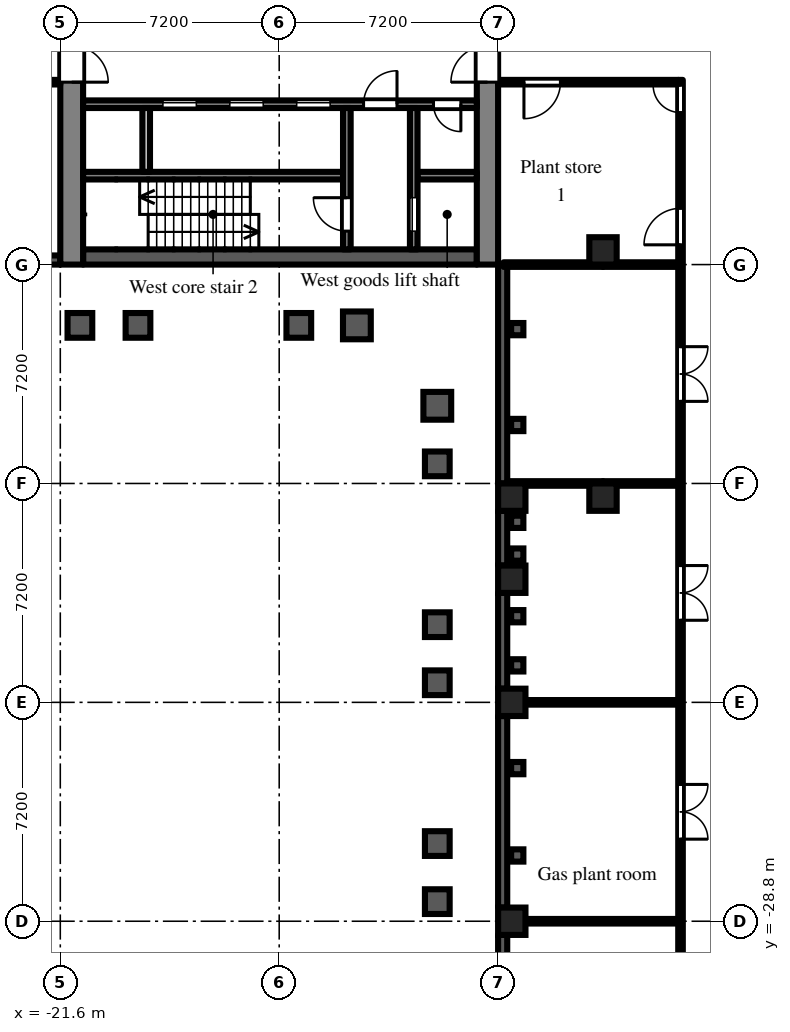
"""IFC4 building model, lengths in metres.
Left out: names, types, materials, properties, quantities, classifications, styles, units other than length and angle.
Written with IfcOpenShell. Run it as: python <this file> out.ifc"""

import sys

from ifc_helpers import new_model, si_unit, direction, frame, frame_2d, origin, origin_2d, place, context, subcontext, project, spatial, rectangle, extrude, element, fill, save


model = new_model("IFC4")
c1 = context("Model", 3, precision=1e-05, world=origin(), true_north=direction((0.0, 1.0)))
c2 = subcontext(c1, "Body", "Model", "MODEL_VIEW")
j1 = project(units=[si_unit("LENGTHUNIT", "METRE"), si_unit("PLANEANGLEUNIT", "RADIAN")], contexts=[c1])
p1 = place(None, origin())
s1 = spatial("IfcSite", under=j1, at=p1, CompositionType="ELEMENT")
p2 = place(p1, origin())
s2 = spatial("IfcBuilding", under=s1, at=p2, CompositionType="ELEMENT")
p3 = place(p2, frame((0.0, 0.0, 62.7)))
s3 = spatial("IfcBuildingStorey", under=s2, at=p3, CompositionType="ELEMENT", Elevation=62.7)
for number, where, z_axis, x_axis in (
    (1, (-6.75, -28.8, 0.0), (0.0, 0.0, 1.0), (1.0, 0.0, 0.0)),
    (2, (-6.75, -21.6, 0.0), (0.0, 0.0, 1.0), (1.0, 0.0, 0.0)),
    (3, (-6.75, -17.55, 0.0), (0.0, 0.0, 1.0), (1.0, 0.0, 0.0)),
    (4, (-6.75, -14.85, 0.0), (0.0, 0.0, 1.0), (1.0, 0.0, 0.0)),
    (5, (-3.75, -14.85, 0.0), (0.0, 0.0, 1.0), (1.0, 0.0, 0.0)),
    (6, (-3.75, -6.75, 0.0), (0.0, 0.0, 1.0), (1.0, 0.0, 0.0)),
):
    element("IfcColumn", number, at=place(p3, frame(where, z_axis=z_axis, x_axis=x_axis)), inside=s3, PredefinedType="COLUMN", context=c2, shape_type="SweptSolid", body=[
        extrude(rectangle(XDim=0.9, YDim=0.9, at=origin_2d()), origin(), (0.0, 0.0, 1.0), 4.2),
    ])
p4 = place(p3, frame((-24.3, -7.05, 0.0), z_axis=(0.0, 0.0, 1.0), x_axis=(1.0, 0.0, 0.0)))
e7 = element("IfcWall", 7, at=p4, inside=s3, PredefinedType="SOLIDWALL", context=c2, shape_type="SweptSolid", body=[
    extrude(rectangle(XDim=2.7, YDim=0.3, at=frame_2d((1.35, 0.0))), origin(), (0.0, 0.0, 1.0), 3.3),
])
p5 = place(p3, frame((-7.05, -7.2, 0.0), z_axis=(0.0, 0.0, 1.0), x_axis=(0.0, -1.0, 0.0)))
e8 = element("IfcWall", 8, at=p5, inside=s3, PredefinedType="SOLIDWALL", context=c2, shape_type="SweptSolid", body=[
    extrude(rectangle(XDim=7.2, YDim=0.3, at=frame_2d((3.6, 0.0))), origin(), (0.0, 0.0, 1.0), 3.775),
])
p6 = place(p3, frame((-7.05, -15.3, 0.0), z_axis=(0.0, 0.0, 1.0), x_axis=(0.0, -1.0, 0.0)))
e9 = element("IfcWall", 9, at=p6, inside=s3, PredefinedType="SOLIDWALL", context=c2, shape_type="SweptSolid", body=[
    extrude(rectangle(XDim=1.8, YDim=0.3, at=frame_2d((0.9, 0.0))), origin(), (0.0, 0.0, 1.0), 3.3),
])
p7 = place(p3, frame((-7.05, -18.0, 0.0), z_axis=(0.0, 0.0, 1.0), x_axis=(0.0, -1.0, 0.0)))
e10 = element("IfcWall", 10, at=p7, inside=s3, PredefinedType="SOLIDWALL", context=c2, shape_type="SweptSolid", body=[
    extrude(rectangle(XDim=3.15, YDim=0.3, at=frame_2d((1.575, 0.0))), origin(), (0.0, 0.0, 1.0), 3.3),
])
for number, where, z_axis, x_axis in (
    (11, (-7.05, -22.05, 0.0), (0.0, 0.0, 1.0), (0.0, -1.0, 0.0)),
    (12, (-7.05, -29.25, 0.0), (0.0, 0.0, 1.0), (0.0, -1.0, 0.0)),
):
    element("IfcWall", number, at=place(p3, frame(where, z_axis=z_axis, x_axis=x_axis)), inside=s3, PredefinedType="SOLIDWALL", context=c2, shape_type="SweptSolid", body=[
        extrude(rectangle(XDim=6.3, YDim=0.3, at=frame_2d((3.15, 0.0))), origin(), (0.0, 0.0, 1.0), 3.3),
    ])
p8 = place(p3, frame((-7.55, -7.2, 0.0), z_axis=(0.0, 0.0, 1.0), x_axis=(0.0, 1.0, 0.0)))
e13 = element("IfcWall", 13, at=p8, inside=s3, PredefinedType="SHEAR", context=c2, shape_type="SweptSolid", body=[
    extrude(rectangle(XDim=14.4, YDim=0.7, at=frame_2d((7.2, 0.0))), origin(), (0.0, 0.0, 1.0), 3.775),
])
p9 = place(p8, frame((6.0, 0.0, 0.0)))
e14 = element("IfcOpeningElement", 14, at=p9, cuts=e13, PredefinedType="OPENING", context=c2, shape_type="SweptSolid", body=[
    extrude(rectangle(XDim=2.4, YDim=2.2, at=frame_2d((1.2, 1.1))), frame((0.0, 0.36, 0.0), z_axis=(0.0, -1.0, 0.0), x_axis=(1.0, 0.0, 0.0)), (0.0, 0.0, 1.0), 0.72),
])
p10 = place(p3, frame((-21.225, -7.2, 0.0), z_axis=(0.0, 0.0, 1.0), x_axis=(0.0, 1.0, 0.0)))
e15 = element("IfcWall", 15, at=p10, inside=s3, PredefinedType="SHEAR", context=c2, shape_type="SweptSolid", body=[
    extrude(rectangle(XDim=14.4, YDim=0.75, at=frame_2d((7.2, 0.0))), origin(), (0.0, 0.0, 1.0), 3.775),
])
p11 = place(p10, frame((6.0, 0.0, 0.0)))
e16 = element("IfcOpeningElement", 16, at=p11, cuts=e15, PredefinedType="OPENING", context=c2, shape_type="SweptSolid", body=[
    extrude(rectangle(XDim=2.4, YDim=2.2, at=frame_2d((1.2, 1.1))), frame((0.0, 0.385, 0.0), z_axis=(0.0, -1.0, 0.0), x_axis=(1.0, 0.0, 0.0)), (0.0, 0.0, 1.0), 0.77),
])
p12 = place(p3, frame((-7.9, -6.95, 0.0), z_axis=(0.0, 0.0, 1.0), x_axis=(-1.0, 0.0, 0.0)))
e17 = element("IfcWall", 17, at=p12, inside=s3, PredefinedType="SHEAR", context=c2, shape_type="SweptSolid", body=[
    extrude(rectangle(XDim=12.95, YDim=0.5, at=frame_2d((6.475, 0.0))), origin(), (0.0, 0.0, 1.0), 3.775),
])
p13 = place(p3, frame((-7.9, -1.925, 0.0), z_axis=(0.0, 0.0, 1.0), x_axis=(-1.0, 0.0, 0.0)))
e18 = element("IfcWall", 18, at=p13, inside=s3, PredefinedType="SHEAR", context=c2, shape_type="SweptSolid", body=[
    extrude(rectangle(XDim=12.95, YDim=0.25, at=frame_2d((6.475, 0.0))), origin(), (0.0, 0.0, 1.0), 3.775),
])
p14 = place(p13, frame((4.825, 0.0, 0.0)))
e19 = element("IfcOpeningElement", 19, at=p14, cuts=e18, PredefinedType="OPENING", context=c2, shape_type="SweptSolid", body=[
    extrude(rectangle(XDim=1.1, YDim=2.1, at=frame_2d((0.55, 1.05))), frame((0.0, 0.135, 0.0), z_axis=(0.0, -1.0, 0.0), x_axis=(1.0, 0.0, 0.0)), (0.0, 0.0, 1.0), 0.27),
])
p15 = place(p13, frame((7.025, 0.0, 0.0)))
e20 = element("IfcOpeningElement", 20, at=p15, cuts=e18, PredefinedType="OPENING", context=c2, shape_type="SweptSolid", body=[
    extrude(rectangle(XDim=1.1, YDim=2.1, at=frame_2d((0.55, 1.05))), frame((0.0, 0.135, 0.0), z_axis=(0.0, -1.0, 0.0), x_axis=(1.0, 0.0, 0.0)), (0.0, 0.0, 1.0), 0.27),
])
p16 = place(p13, frame((9.225, 0.0, 0.0)))
e21 = element("IfcOpeningElement", 21, at=p16, cuts=e18, PredefinedType="OPENING", context=c2, shape_type="SweptSolid", body=[
    extrude(rectangle(XDim=1.1, YDim=2.1, at=frame_2d((0.55, 1.05))), frame((0.0, 0.135, 0.0), z_axis=(0.0, -1.0, 0.0), x_axis=(1.0, 0.0, 0.0)), (0.0, 0.0, 1.0), 0.27),
])
p17 = place(p13, frame((0.525, 0.0, 0.0)))
e22 = element("IfcOpeningElement", 22, at=p17, cuts=e18, PredefinedType="OPENING", context=c2, shape_type="SweptSolid", body=[
    extrude(rectangle(XDim=0.9, YDim=2.1, at=frame_2d((0.45, 1.05))), frame((0.0, 0.135, 0.0), z_axis=(0.0, -1.0, 0.0), x_axis=(1.0, 0.0, 0.0)), (0.0, 0.0, 1.0), 0.27),
])
p18 = place(p13, frame((2.625, 0.0, 0.0)))
e23 = element("IfcOpeningElement", 23, at=p18, cuts=e18, PredefinedType="OPENING", context=c2, shape_type="SweptSolid", body=[
    extrude(rectangle(XDim=1.1, YDim=2.1, at=frame_2d((0.55, 1.05))), frame((0.0, 0.135, 0.0), z_axis=(0.0, -1.0, 0.0), x_axis=(1.0, 0.0, 0.0)), (0.0, 0.0, 1.0), 0.27),
])
p19 = place(p3, frame((-7.9, -4.275, 0.0), z_axis=(0.0, 0.0, 1.0), x_axis=(-1.0, 0.0, 0.0)))
e24 = element("IfcWall", 24, at=p19, inside=s3, PredefinedType="SHEAR", context=c2, shape_type="SweptSolid", body=[
    extrude(rectangle(XDim=1.95, YDim=0.25, at=frame_2d((0.975, 0.0))), origin(), (0.0, 0.0, 1.0), 3.775),
])
p20 = place(p3, frame((-12.3, -4.275, 0.0), z_axis=(0.0, 0.0, 1.0), x_axis=(-1.0, 0.0, 0.0)))
e25 = element("IfcWall", 25, at=p20, inside=s3, PredefinedType="SHEAR", context=c2, shape_type="SweptSolid", body=[
    extrude(rectangle(XDim=8.55, YDim=0.25, at=frame_2d((4.275, 0.0))), origin(), (0.0, 0.0, 1.0), 3.775),
])
p21 = place(p3, frame((-9.975, -2.05, 0.0), z_axis=(0.0, 0.0, 1.0), x_axis=(0.0, -1.0, 0.0)))
e26 = element("IfcWall", 26, at=p21, inside=s3, PredefinedType="SHEAR", context=c2, shape_type="SweptSolid", body=[
    extrude(rectangle(XDim=4.65, YDim=0.25, at=frame_2d((2.325, 0.0))), origin(), (0.0, 0.0, 1.0), 3.775),
])
p22 = place(p21, frame((2.95, 0.0, 0.0)))
e27 = element("IfcOpeningElement", 27, at=p22, cuts=e26, PredefinedType="OPENING", context=c2, shape_type="SweptSolid", body=[
    extrude(rectangle(XDim=1.1, YDim=2.1, at=frame_2d((0.55, 1.05))), frame((0.0, 0.135, 0.0), z_axis=(0.0, -1.0, 0.0), x_axis=(1.0, 0.0, 0.0)), (0.0, 0.0, 1.0), 0.27),
])
p23 = place(p3, frame((-12.175, -2.05, 0.0), z_axis=(0.0, 0.0, 1.0), x_axis=(0.0, -1.0, 0.0)))
e28 = element("IfcWall", 28, at=p23, inside=s3, PredefinedType="SHEAR", context=c2, shape_type="SweptSolid", body=[
    extrude(rectangle(XDim=4.65, YDim=0.25, at=frame_2d((2.325, 0.0))), origin(), (0.0, 0.0, 1.0), 3.775),
])
p24 = place(p23, frame((2.95, 0.0, 0.0)))
e29 = element("IfcOpeningElement", 29, at=p24, cuts=e28, PredefinedType="OPENING", context=c2, shape_type="SweptSolid", body=[
    extrude(rectangle(XDim=1.1, YDim=2.1, at=frame_2d((0.55, 1.05))), frame((0.0, 0.135, 0.0), z_axis=(0.0, -1.0, 0.0), x_axis=(1.0, 0.0, 0.0)), (0.0, 0.0, 1.0), 0.27),
])
p25 = place(p3, frame((-18.775, -2.05, 0.0), z_axis=(0.0, 0.0, 1.0), x_axis=(0.0, -1.0, 0.0)))
e30 = element("IfcWall", 30, at=p25, inside=s3, PredefinedType="PARTITIONING", context=c2, shape_type="SweptSolid", body=[
    extrude(rectangle(XDim=2.1, YDim=0.25, at=frame_2d((1.05, 0.0))), origin(), (0.0, 0.0, 1.0), 3.775),
])
p26 = place(p3, frame((-36.5, -1.2, 0.0), z_axis=(0.0, 0.0, 1.0), x_axis=(1.0, 0.0, 0.0)))
e31 = element("IfcWall", 31, at=p26, inside=s3, PredefinedType="PARTITIONING", context=c2, shape_type="SweptSolid", body=[
    extrude(rectangle(XDim=14.9, YDim=0.15, at=frame_2d((7.45, 0.0))), origin(), (0.0, 0.0, 1.0), 3.775),
])
p27 = place(p26, frame((12.5, 0.0, 0.0)))
e32 = element("IfcOpeningElement", 32, at=p27, cuts=e31, PredefinedType="OPENING", context=c2, shape_type="SweptSolid", body=[
    extrude(rectangle(XDim=1.2, YDim=2.1, at=frame_2d((0.6, 1.05))), frame((0.0, 0.085, 0.0), z_axis=(0.0, -1.0, 0.0), x_axis=(1.0, 0.0, 0.0)), (0.0, 0.0, 1.0), 0.17),
])
p28 = place(p26, frame((6.8, 0.0, 0.0)))
e33 = element("IfcOpeningElement", 33, at=p28, cuts=e31, PredefinedType="OPENING", context=c2, shape_type="SweptSolid", body=[
    extrude(rectangle(XDim=1.8, YDim=2.1, at=frame_2d((0.9, 1.05))), frame((0.0, 0.085, 0.0), z_axis=(0.0, -1.0, 0.0), x_axis=(1.0, 0.0, 0.0)), (0.0, 0.0, 1.0), 0.17),
])
p29 = place(p26, frame((1.15, 0.0, 0.0)))
e34 = element("IfcOpeningElement", 34, at=p29, cuts=e31, PredefinedType="OPENING", context=c2, shape_type="SweptSolid", body=[
    extrude(rectangle(XDim=1.8, YDim=2.1, at=frame_2d((0.9, 1.05))), frame((0.0, 0.085, 0.0), z_axis=(0.0, -1.0, 0.0), x_axis=(1.0, 0.0, 0.0)), (0.0, 0.0, 1.0), 0.17),
])
p30 = place(p3, frame((-7.2, -1.2, 0.0), z_axis=(0.0, 0.0, 1.0), x_axis=(1.0, 0.0, 0.0)))
e35 = element("IfcWall", 35, at=p30, inside=s3, PredefinedType="PARTITIONING", context=c2, shape_type="SweptSolid", body=[
    extrude(rectangle(XDim=5.925, YDim=0.15, at=frame_2d((2.962, 0.0))), origin(), (0.0, 0.0, 1.0), 3.775),
])
p31 = place(p30, frame((0.85, 0.0, 0.0)))
e36 = element("IfcOpeningElement", 36, at=p31, cuts=e35, PredefinedType="OPENING", context=c2, shape_type="SweptSolid", body=[
    extrude(rectangle(XDim=1.2, YDim=2.1, at=frame_2d((0.6, 1.05))), frame((0.0, 0.085, 0.0), z_axis=(0.0, -1.0, 0.0), x_axis=(1.0, 0.0, 0.0)), (0.0, 0.0, 1.0), 0.17),
])
for number, where, z_axis, x_axis in (
    (37, (-6.9, -28.8, 0.0), (0.0, 0.0, 1.0), (1.0, 0.0, 0.0)),
    (38, (-6.9, -21.6, 0.0), (0.0, 0.0, 1.0), (1.0, 0.0, 0.0)),
):
    element("IfcWall", number, at=place(p3, frame(where, z_axis=z_axis, x_axis=x_axis)), inside=s3, PredefinedType="PARTITIONING", context=c2, shape_type="SweptSolid", body=[
        extrude(rectangle(XDim=5.625, YDim=0.15, at=frame_2d((2.812, 0.0))), origin(), (0.0, 0.0, 1.0), 3.775),
    ])
p32 = place(p3, frame((-6.9, -14.4, 0.0), z_axis=(0.0, 0.0, 1.0), x_axis=(1.0, 0.0, 0.0)))
e39 = element("IfcWall", 39, at=p32, inside=s3, PredefinedType="PARTITIONING", context=c2, shape_type="SweptSolid", body=[
    extrude(rectangle(XDim=3.15, YDim=0.15, at=frame_2d((1.575, 0.0))), origin(), (0.0, 0.0, 1.0), 3.3),
])
p33 = place(p3, frame((-7.02, -7.2, 0.0), z_axis=(0.0, 0.0, 1.0), x_axis=(1.0, 0.0, 0.0)))
e40 = element("IfcWall", 40, at=p33, inside=s3, PredefinedType="PARTITIONING", context=c2, shape_type="SweptSolid", body=[
    extrude(rectangle(XDim=3.27, YDim=0.15, at=frame_2d((1.635, 0.0))), origin(), (0.0, 0.0, 1.0), 3.3),
])
p34 = place(p3, frame((-1.2, -36.5, 0.0), z_axis=(0.0, 0.0, 1.0), x_axis=(0.0, 1.0, 0.0)))
e41 = element("IfcWall", 41, at=p34, inside=s3, PredefinedType="PARTITIONING", context=c2, shape_type="SweptSolid", body=[
    extrude(rectangle(XDim=35.375, YDim=0.15, at=frame_2d((17.688, 0.0))), origin(), (0.0, 0.0, 1.0), 3.775),
])
p35 = place(p34, frame((29.95, 0.0, 0.0)))
e42 = element("IfcOpeningElement", 42, at=p35, cuts=e41, PredefinedType="OPENING", context=c2, shape_type="SweptSolid", body=[
    extrude(rectangle(XDim=1.2, YDim=2.1, at=frame_2d((0.6, 1.05))), frame((0.0, 0.085, 0.0), z_axis=(0.0, -1.0, 0.0), x_axis=(1.0, 0.0, 0.0)), (0.0, 0.0, 1.0), 0.17),
])
p36 = place(p34, frame((34.3, 0.0, 0.0)))
e43 = element("IfcOpeningElement", 43, at=p36, cuts=e41, PredefinedType="OPENING", context=c2, shape_type="SweptSolid", body=[
    extrude(rectangle(XDim=0.9, YDim=2.1, at=frame_2d((0.45, 1.05))), frame((0.0, 0.085, 0.0), z_axis=(0.0, -1.0, 0.0), x_axis=(1.0, 0.0, 0.0)), (0.0, 0.0, 1.0), 0.17),
])
p37 = place(p34, frame((24.8, 0.0, 0.0)))
e44 = element("IfcOpeningElement", 44, at=p37, cuts=e41, PredefinedType="OPENING", context=c2, shape_type="SweptSolid", body=[
    extrude(rectangle(XDim=1.8, YDim=2.1, at=frame_2d((0.9, 1.05))), frame((0.0, 0.085, 0.0), z_axis=(0.0, -1.0, 0.0), x_axis=(1.0, 0.0, 0.0)), (0.0, 0.0, 1.0), 0.17),
])
p38 = place(p34, frame((17.6, 0.0, 0.0)))
e45 = element("IfcOpeningElement", 45, at=p38, cuts=e41, PredefinedType="OPENING", context=c2, shape_type="SweptSolid", body=[
    extrude(rectangle(XDim=1.8, YDim=2.1, at=frame_2d((0.9, 1.05))), frame((0.0, 0.085, 0.0), z_axis=(0.0, -1.0, 0.0), x_axis=(1.0, 0.0, 0.0)), (0.0, 0.0, 1.0), 0.17),
])
p39 = place(p34, frame((10.4, 0.0, 0.0)))
e46 = element("IfcOpeningElement", 46, at=p39, cuts=e41, PredefinedType="OPENING", context=c2, shape_type="SweptSolid", body=[
    extrude(rectangle(XDim=1.8, YDim=2.1, at=frame_2d((0.9, 1.05))), frame((0.0, 0.085, 0.0), z_axis=(0.0, -1.0, 0.0), x_axis=(1.0, 0.0, 0.0)), (0.0, 0.0, 1.0), 0.17),
])
p40 = place(p34, frame((2.95, 0.0, 0.0)))
e47 = element("IfcOpeningElement", 47, at=p40, cuts=e41, PredefinedType="OPENING", context=c2, shape_type="SweptSolid", body=[
    extrude(rectangle(XDim=1.8, YDim=2.1, at=frame_2d((0.9, 1.05))), frame((0.0, 0.085, 0.0), z_axis=(0.0, -1.0, 0.0), x_axis=(1.0, 0.0, 0.0)), (0.0, 0.0, 1.0), 0.17),
])
for number, where, z_axis, x_axis in (
    (48, (-3.75, -14.4, 0.0), (0.0, 0.0, 1.0), (1.0, 0.0, 0.0)),
    (49, (-3.75, -7.2, 0.0), (0.0, 0.0, 1.0), (1.0, 0.0, 0.0)),
):
    element("IfcWall", number, at=place(p3, frame(where, z_axis=z_axis, x_axis=x_axis)), inside=s3, PredefinedType="PARTITIONING", context=c2, shape_type="SweptSolid", body=[
        extrude(rectangle(XDim=2.475, YDim=0.15, at=frame_2d((1.238, 0.0))), origin(), (0.0, 0.0, 1.0), 3.775),
    ])
p41 = place(p14, origin())
e50 = element("IfcDoor", 50, at=p41, inside=s3, OperationType="SLIDING_TO_LEFT", PredefinedType="DOOR", context=c2, shape_type="SweptSolid", body=[
    extrude(rectangle(XDim=1.1, YDim=2.1, at=frame_2d((0.55, 1.05))), frame((0.0, 0.025, 0.0), z_axis=(0.0, -1.0, 0.0), x_axis=(1.0, 0.0, 0.0)), (0.0, 0.0, 1.0), 0.05),
])
fill(e19, e50)
p42 = place(p15, origin())
e51 = element("IfcDoor", 51, at=p42, inside=s3, OperationType="SLIDING_TO_LEFT", PredefinedType="DOOR", context=c2, shape_type="SweptSolid", body=[
    extrude(rectangle(XDim=1.1, YDim=2.1, at=frame_2d((0.55, 1.05))), frame((0.0, 0.025, 0.0), z_axis=(0.0, -1.0, 0.0), x_axis=(1.0, 0.0, 0.0)), (0.0, 0.0, 1.0), 0.05),
])
fill(e20, e51)
p43 = place(p16, origin())
e52 = element("IfcDoor", 52, at=p43, inside=s3, OperationType="SLIDING_TO_LEFT", PredefinedType="DOOR", context=c2, shape_type="SweptSolid", body=[
    extrude(rectangle(XDim=1.1, YDim=2.1, at=frame_2d((0.55, 1.05))), frame((0.0, 0.025, 0.0), z_axis=(0.0, -1.0, 0.0), x_axis=(1.0, 0.0, 0.0)), (0.0, 0.0, 1.0), 0.05),
])
fill(e21, e52)
p44 = place(p22, origin())
e53 = element("IfcDoor", 53, at=p44, inside=s3, OperationType="SLIDING_TO_LEFT", PredefinedType="DOOR", context=c2, shape_type="SweptSolid", body=[
    extrude(rectangle(XDim=1.1, YDim=2.1, at=frame_2d((0.55, 1.05))), frame((0.0, 0.025, 0.0), z_axis=(0.0, -1.0, 0.0), x_axis=(1.0, 0.0, 0.0)), (0.0, 0.0, 1.0), 0.05),
])
fill(e27, e53)
p45 = place(p24, frame((1.1, 0.0, 0.0), z_axis=(0.0, 0.0, 1.0), x_axis=(-1.0, 0.0, 0.0)))
e54 = element("IfcDoor", 54, at=p45, inside=s3, OperationType="SINGLE_SWING_RIGHT", PredefinedType="DOOR", context=c2, shape_type="SweptSolid", body=[
    extrude(rectangle(XDim=1.1, YDim=2.1, at=frame_2d((0.55, 1.05))), frame((0.0, 0.025, 0.0), z_axis=(0.0, -1.0, 0.0), x_axis=(1.0, 0.0, 0.0)), (0.0, 0.0, 1.0), 0.05),
])
fill(e29, e54)
p46 = place(p17, origin())
e55 = element("IfcDoor", 55, at=p46, inside=s3, OperationType="SINGLE_SWING_LEFT", PredefinedType="DOOR", context=c2, shape_type="SweptSolid", body=[
    extrude(rectangle(XDim=0.9, YDim=2.1, at=frame_2d((0.45, 1.05))), frame((0.0, 0.025, 0.0), z_axis=(0.0, -1.0, 0.0), x_axis=(1.0, 0.0, 0.0)), (0.0, 0.0, 1.0), 0.05),
])
fill(e22, e55)
p47 = place(p18, frame((1.1, 0.0, 0.0), z_axis=(0.0, 0.0, 1.0), x_axis=(-1.0, 0.0, 0.0)))
e56 = element("IfcDoor", 56, at=p47, inside=s3, OperationType="SINGLE_SWING_RIGHT", PredefinedType="DOOR", context=c2, shape_type="SweptSolid", body=[
    extrude(rectangle(XDim=1.1, YDim=2.1, at=frame_2d((0.55, 1.05))), frame((0.0, 0.025, 0.0), z_axis=(0.0, -1.0, 0.0), x_axis=(1.0, 0.0, 0.0)), (0.0, 0.0, 1.0), 0.05),
])
fill(e23, e56)
p48 = place(p9, origin())
e57 = element("IfcDoor", 57, at=p48, inside=s3, OperationType="DOUBLE_DOOR_DOUBLE_SWING", PredefinedType="DOOR", context=c2, shape_type="SweptSolid", body=[
    extrude(rectangle(XDim=2.4, YDim=2.2, at=frame_2d((1.2, 1.1))), frame((0.0, 0.025, 0.0), z_axis=(0.0, -1.0, 0.0), x_axis=(1.0, 0.0, 0.0)), (0.0, 0.0, 1.0), 0.05),
])
fill(e14, e57)
p49 = place(p11, frame((2.4, 0.0, 0.0), z_axis=(0.0, 0.0, 1.0), x_axis=(-1.0, 0.0, 0.0)))
e58 = element("IfcDoor", 58, at=p49, inside=s3, OperationType="DOUBLE_DOOR_DOUBLE_SWING", PredefinedType="DOOR", context=c2, shape_type="SweptSolid", body=[
    extrude(rectangle(XDim=2.4, YDim=2.2, at=frame_2d((1.2, 1.1))), frame((0.0, 0.025, 0.0), z_axis=(0.0, -1.0, 0.0), x_axis=(1.0, 0.0, 0.0)), (0.0, 0.0, 1.0), 0.05),
])
fill(e16, e58)
p50 = place(p31, frame((1.2, 0.0, 0.0), z_axis=(0.0, 0.0, 1.0), x_axis=(-1.0, 0.0, 0.0)))
e59 = element("IfcDoor", 59, at=p50, inside=s3, OperationType="SINGLE_SWING_RIGHT", PredefinedType="DOOR", context=c2, shape_type="SweptSolid", body=[
    extrude(rectangle(XDim=1.2, YDim=2.1, at=frame_2d((0.6, 1.05))), frame((0.0, 0.025, 0.0), z_axis=(0.0, -1.0, 0.0), x_axis=(1.0, 0.0, 0.0)), (0.0, 0.0, 1.0), 0.05),
])
fill(e36, e59)
p51 = place(p35, origin())
e60 = element("IfcDoor", 60, at=p51, inside=s3, OperationType="SINGLE_SWING_LEFT", PredefinedType="DOOR", context=c2, shape_type="SweptSolid", body=[
    extrude(rectangle(XDim=1.2, YDim=2.1, at=frame_2d((0.6, 1.05))), frame((0.0, 0.025, 0.0), z_axis=(0.0, -1.0, 0.0), x_axis=(1.0, 0.0, 0.0)), (0.0, 0.0, 1.0), 0.05),
])
fill(e42, e60)
p52 = place(p36, origin())
e61 = element("IfcDoor", 61, at=p52, inside=s3, OperationType="SINGLE_SWING_RIGHT", PredefinedType="DOOR", context=c2, shape_type="SweptSolid", body=[
    extrude(rectangle(XDim=0.9, YDim=2.1, at=frame_2d((0.45, 1.05))), frame((0.0, 0.025, 0.0), z_axis=(0.0, -1.0, 0.0), x_axis=(1.0, 0.0, 0.0)), (0.0, 0.0, 1.0), 0.05),
])
fill(e43, e61)
p53 = place(p37, frame((1.8, 0.0, 0.0), z_axis=(0.0, 0.0, 1.0), x_axis=(-1.0, 0.0, 0.0)))
e62 = element("IfcDoor", 62, at=p53, inside=s3, OperationType="DOUBLE_DOOR_DOUBLE_SWING", PredefinedType="DOOR", context=c2, shape_type="SweptSolid", body=[
    extrude(rectangle(XDim=1.8, YDim=2.1, at=frame_2d((0.9, 1.05))), frame((0.0, 0.025, 0.0), z_axis=(0.0, -1.0, 0.0), x_axis=(1.0, 0.0, 0.0)), (0.0, 0.0, 1.0), 0.05),
])
fill(e44, e62)
p54 = place(p38, frame((1.8, 0.0, 0.0), z_axis=(0.0, 0.0, 1.0), x_axis=(-1.0, 0.0, 0.0)))
e63 = element("IfcDoor", 63, at=p54, inside=s3, OperationType="DOUBLE_DOOR_DOUBLE_SWING", PredefinedType="DOOR", context=c2, shape_type="SweptSolid", body=[
    extrude(rectangle(XDim=1.8, YDim=2.1, at=frame_2d((0.9, 1.05))), frame((0.0, 0.025, 0.0), z_axis=(0.0, -1.0, 0.0), x_axis=(1.0, 0.0, 0.0)), (0.0, 0.0, 1.0), 0.05),
])
fill(e45, e63)
p55 = place(p39, frame((1.8, 0.0, 0.0), z_axis=(0.0, 0.0, 1.0), x_axis=(-1.0, 0.0, 0.0)))
e64 = element("IfcDoor", 64, at=p55, inside=s3, OperationType="DOUBLE_DOOR_DOUBLE_SWING", PredefinedType="DOOR", context=c2, shape_type="SweptSolid", body=[
    extrude(rectangle(XDim=1.8, YDim=2.1, at=frame_2d((0.9, 1.05))), frame((0.0, 0.025, 0.0), z_axis=(0.0, -1.0, 0.0), x_axis=(1.0, 0.0, 0.0)), (0.0, 0.0, 1.0), 0.05),
])
fill(e46, e64)
save(model, sys.argv[1])
